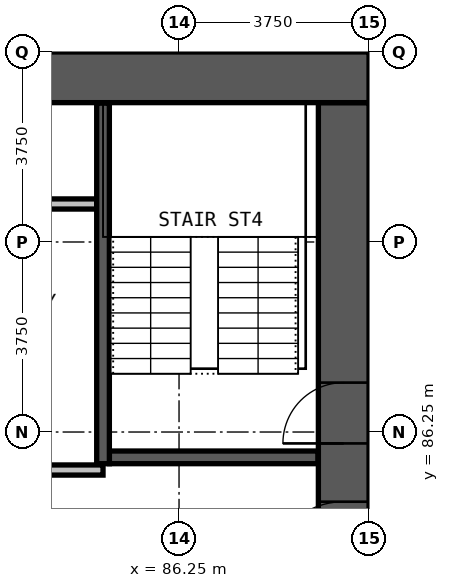
"""IFC4 building model, lengths in metres.
Left out: names, types, materials, properties, quantities, classifications, styles, units other than length and angle.
Written with IfcOpenShell. Run it as: python <this file> out.ifc"""

import sys

from ifc_helpers import new_model, si_unit, direction, frame, frame_2d, origin, place, context, subcontext, project, spatial, rectangle, extrude, element, fill, save


model = new_model("IFC4")
c1 = context("Model", 3, precision=1e-05, world=origin(), true_north=direction((0.0, 1.0)))
c2 = subcontext(c1, "Body", "Model", "MODEL_VIEW")
j1 = project(units=[si_unit("LENGTHUNIT", "METRE"), si_unit("PLANEANGLEUNIT", "RADIAN")], contexts=[c1])
p1 = place(None, origin())
s1 = spatial("IfcSite", under=j1, at=p1, CompositionType="ELEMENT")
p2 = place(p1, origin())
s2 = spatial("IfcBuilding", under=s1, at=p2, CompositionType="ELEMENT")
p3 = place(p2, frame((0.0, 0.0, 62.6)))
s3 = spatial("IfcBuildingStorey", under=s2, at=p3, CompositionType="ELEMENT", Elevation=62.6)
p4 = place(p3, frame((89.5, 72.25, 0.0), z_axis=(0.0, 0.0, 1.0), x_axis=(0.0, 1.0, 0.0)))
e1 = element("IfcWall", 1, at=p4, inside=s3, PredefinedType="SHEAR", context=c2, shape_type="SweptSolid", body=[
    extrude(rectangle(XDim=20.5, YDim=1.0, at=frame_2d((10.25, 0.0))), origin(), (0.0, 0.0, 1.0), 3.3),
])
p5 = place(p4, frame((0.275, 0.0, 0.0)))
e2 = element("IfcOpeningElement", 2, at=p5, cuts=e1, PredefinedType="OPENING", context=c2, shape_type="SweptSolid", body=[
    extrude(rectangle(XDim=1.2, YDim=2.2, at=frame_2d((0.6, 1.1))), frame((0.0, 0.51, 0.0), z_axis=(0.0, -1.0, 0.0), x_axis=(1.0, 0.0, 0.0)), (0.0, 0.0, 1.0), 1.02),
])
p6 = place(p4, frame((13.775, 0.0, 0.0)))
e3 = element("IfcOpeningElement", 3, at=p6, cuts=e1, PredefinedType="OPENING", context=c2, shape_type="SweptSolid", body=[
    extrude(rectangle(XDim=1.2, YDim=2.2, at=frame_2d((0.6, 1.1))), frame((0.0, 0.51, 0.0), z_axis=(0.0, -1.0, 0.0), x_axis=(1.0, 0.0, 0.0)), (0.0, 0.0, 1.0), 1.02),
])
p7 = place(p4, frame((7.875, 0.0, 0.0)))
e4 = element("IfcOpeningElement", 4, at=p7, cuts=e1, PredefinedType="OPENING", context=c2, shape_type="SweptSolid", body=[
    extrude(rectangle(XDim=1.5, YDim=2.2, at=frame_2d((0.75, 1.1))), frame((0.0, 0.51, 0.0), z_axis=(0.0, -1.0, 0.0), x_axis=(1.0, 0.0, 0.0)), (0.0, 0.0, 1.0), 1.02),
])
p8 = place(p4, frame((11.125, 0.0, 0.0)))
e5 = element("IfcOpeningElement", 5, at=p8, cuts=e1, PredefinedType="OPENING", context=c2, shape_type="SweptSolid", body=[
    extrude(rectangle(XDim=1.5, YDim=2.2, at=frame_2d((0.75, 1.1))), frame((0.0, 0.51, 0.0), z_axis=(0.0, -1.0, 0.0), x_axis=(1.0, 0.0, 0.0)), (0.0, 0.0, 1.0), 1.02),
])
p9 = place(p3, frame((90.0, 93.25, 0.0), z_axis=(0.0, 0.0, 1.0), x_axis=(-1.0, 0.0, 0.0)))
e6 = element("IfcWall", 6, at=p9, inside=s3, PredefinedType="SHEAR", context=c2, shape_type="SweptSolid", body=[
    extrude(rectangle(XDim=30.0, YDim=1.0, at=frame_2d((15.0, 0.0))), origin(), (0.0, 0.0, 1.0), 3.3),
])
p10 = place(p3, frame((75.1, 85.5, 0.0), z_axis=(0.0, 0.0, 1.0), x_axis=(1.0, 0.0, 0.0)))
e7 = element("IfcWall", 7, at=p10, inside=s3, PredefinedType="PARTITIONING", context=c2, shape_type="SweptSolid", body=[
    extrude(rectangle(XDim=9.65, YDim=0.2, at=frame_2d((4.825, 0.0))), origin(), (0.0, 0.0, 1.0), 3.0),
])
p11 = place(p10, frame((1.0, 0.0, 0.0)))
e8 = element("IfcOpeningElement", 8, at=p11, cuts=e7, PredefinedType="OPENING", context=c2, shape_type="SweptSolid", body=[
    extrude(rectangle(XDim=0.9, YDim=2.2, at=frame_2d((0.45, 1.1))), frame((0.0, 0.11, 0.0), z_axis=(0.0, -1.0, 0.0), x_axis=(1.0, 0.0, 0.0)), (0.0, 0.0, 1.0), 0.22),
])
p12 = place(p10, frame((4.2, 0.0, 0.0)))
e9 = element("IfcOpeningElement", 9, at=p12, cuts=e7, PredefinedType="OPENING", context=c2, shape_type="SweptSolid", body=[
    extrude(rectangle(XDim=0.9, YDim=2.2, at=frame_2d((0.45, 1.1))), frame((0.0, 0.11, 0.0), z_axis=(0.0, -1.0, 0.0), x_axis=(1.0, 0.0, 0.0)), (0.0, 0.0, 1.0), 0.22),
])
p13 = place(p10, frame((7.55, 0.0, 0.0)))
e10 = element("IfcOpeningElement", 10, at=p13, cuts=e7, PredefinedType="OPENING", context=c2, shape_type="SweptSolid", body=[
    extrude(rectangle(XDim=0.9, YDim=2.2, at=frame_2d((0.45, 1.1))), frame((0.0, 0.11, 0.0), z_axis=(0.0, -1.0, 0.0), x_axis=(1.0, 0.0, 0.0)), (0.0, 0.0, 1.0), 0.22),
])
p14 = place(p3, frame((75.26, 90.75, 0.0), z_axis=(0.0, 0.0, 1.0), x_axis=(1.0, 0.0, 0.0)))
e11 = element("IfcWall", 11, at=p14, inside=s3, PredefinedType="PARTITIONING", context=c2, shape_type="SweptSolid", body=[
    extrude(rectangle(XDim=9.365, YDim=0.2, at=frame_2d((4.683, 0.0))), origin(), (0.0, 0.0, 1.0), 3.0),
])
p15 = place(p3, frame((84.875, 85.75, 0.0), z_axis=(0.0, 0.0, 1.0), x_axis=(1.0, 0.0, 0.0)))
e12 = element("IfcWall", 12, at=p15, inside=s3, PredefinedType="PARTITIONING", context=c2, shape_type="SweptSolid", body=[
    extrude(rectangle(XDim=4.115, YDim=0.25, at=frame_2d((2.058, 0.0))), origin(), (0.0, 0.0, 1.0), 3.0),
])
p16 = place(p3, frame((84.75, 85.625, 0.0), z_axis=(0.0, 0.0, 1.0), x_axis=(0.0, 1.0, 0.0)))
e13 = element("IfcWall", 13, at=p16, inside=s3, PredefinedType="PARTITIONING", context=c2, shape_type="SweptSolid", body=[
    extrude(rectangle(XDim=7.115, YDim=0.25, at=frame_2d((3.558, 0.0))), origin(), (0.0, 0.0, 1.0), 3.0),
])
p17 = place(p6, origin())
e14 = element("IfcDoor", 14, at=p17, inside=s3, OperationType="SINGLE_SWING_LEFT", PredefinedType="DOOR", context=c2, shape_type="SweptSolid", body=[
    extrude(rectangle(XDim=1.2, YDim=2.2, at=frame_2d((0.6, 1.1))), frame((0.0, 0.025, 0.0), z_axis=(0.0, -1.0, 0.0), x_axis=(1.0, 0.0, 0.0)), (0.0, 0.0, 1.0), 0.05),
])
fill(e3, e14)
p18 = place(p8, origin())
e15 = element("IfcDoor", 15, at=p18, inside=s3, OperationType="DOUBLE_DOOR_SINGLE_SWING", PredefinedType="DOOR", context=c2, shape_type="SweptSolid", body=[
    extrude(rectangle(XDim=1.5, YDim=2.2, at=frame_2d((0.75, 1.1))), frame((0.0, 0.025, 0.0), z_axis=(0.0, -1.0, 0.0), x_axis=(1.0, 0.0, 0.0)), (0.0, 0.0, 1.0), 0.05),
])
fill(e5, e15)
save(model, sys.argv[1])
